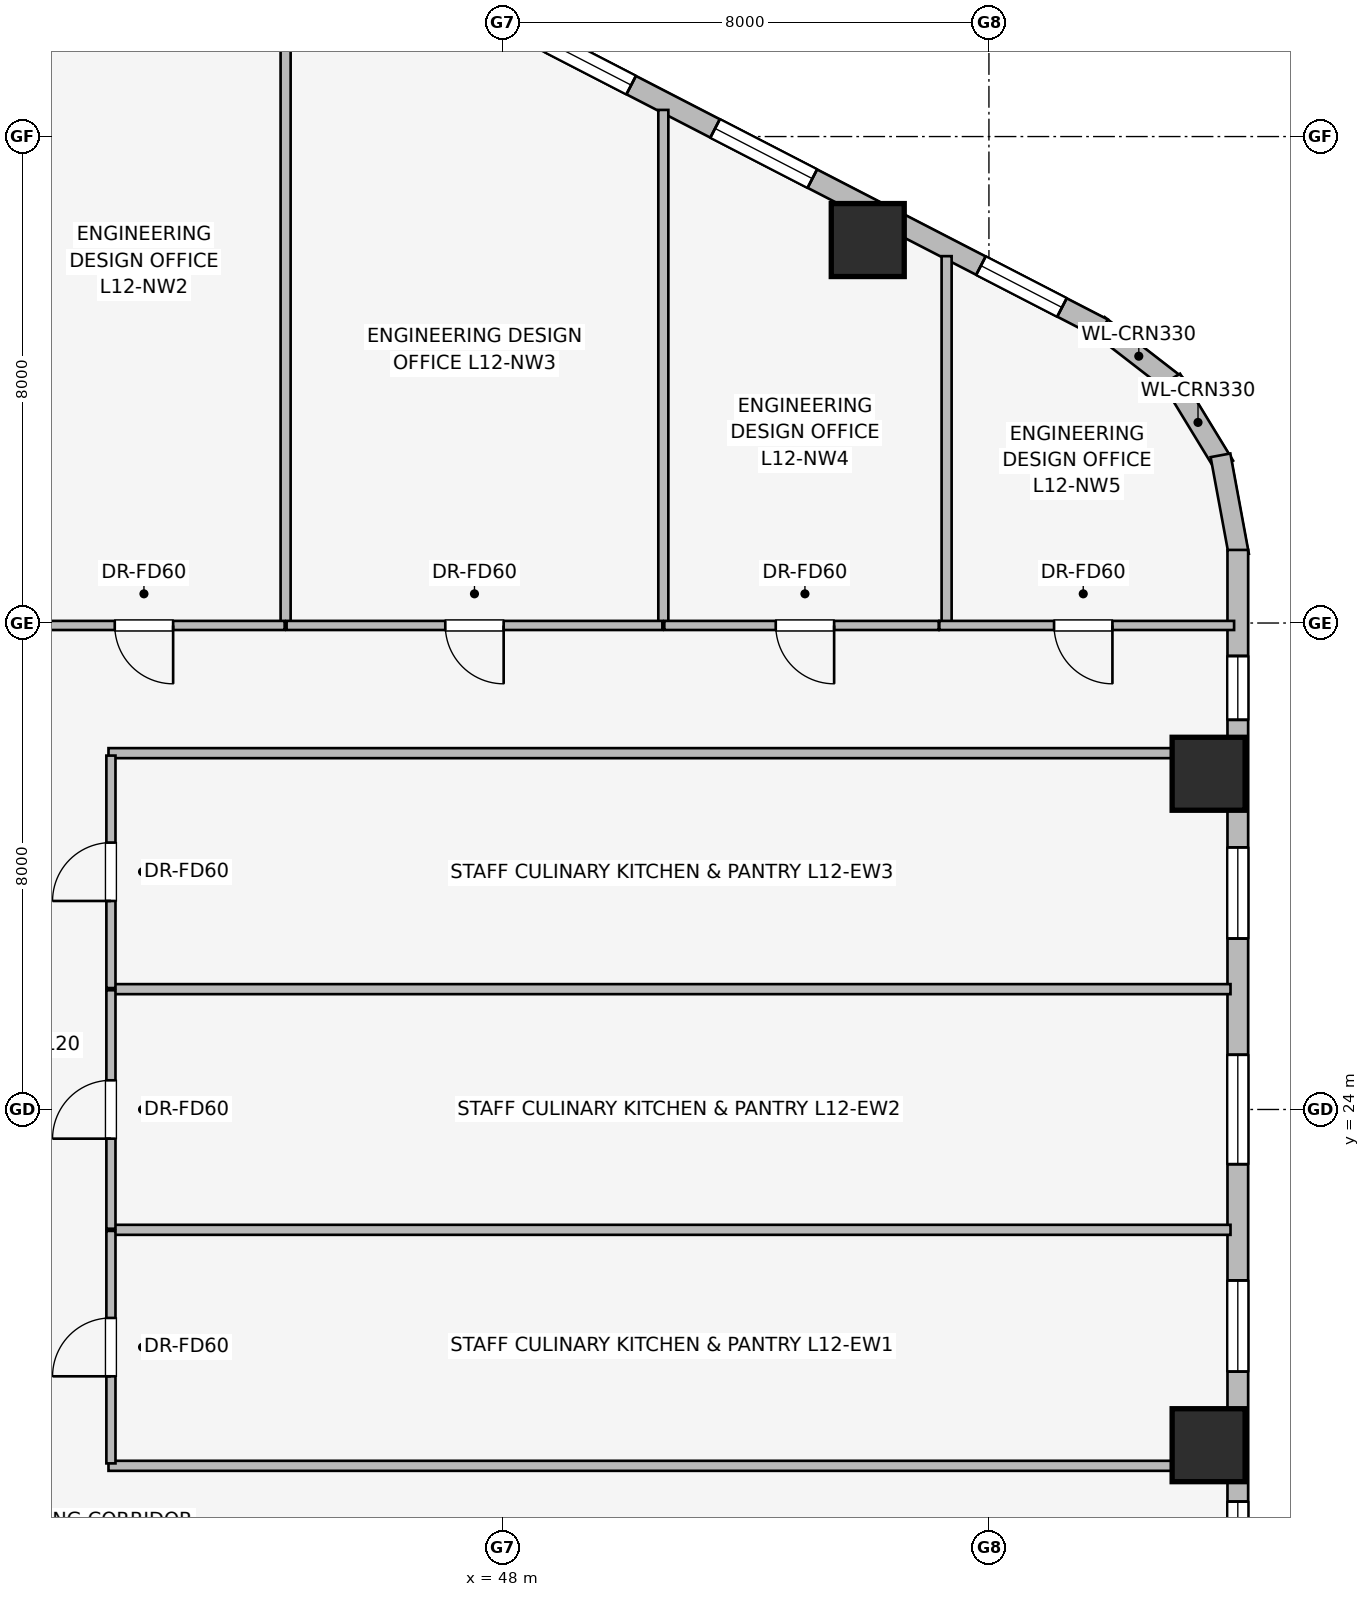
"""IFC4 building model, lengths in metres.
Left out: names, types, materials, properties, quantities, classifications, styles, units other than length and angle.
Written with IfcOpenShell. Run it as: python <this file> out.ifc"""

import sys

from ifc_helpers import new_model, si_unit, direction, frame, frame_2d, origin, origin_2d, place, context, subcontext, project, spatial, rectangle, extrude, element, fill, save


model = new_model("IFC4")
c1 = context("Model", 3, precision=1e-05, world=origin(), true_north=direction((0.0, 1.0)))
c2 = subcontext(c1, "Body", "Model", "MODEL_VIEW")
j1 = project(units=[si_unit("LENGTHUNIT", "METRE"), si_unit("PLANEANGLEUNIT", "RADIAN")], contexts=[c1])
p1 = place(None, origin())
s1 = spatial("IfcSite", under=j1, at=p1, CompositionType="ELEMENT")
p2 = place(p1, origin())
s2 = spatial("IfcBuilding", under=s1, at=p2, CompositionType="ELEMENT")
p3 = place(p2, frame((0.0, 0.0, 48.9)))
s3 = spatial("IfcBuildingStorey", under=s2, at=p3, CompositionType="ELEMENT", Elevation=48.9)
for number, where, z_axis, x_axis in (
    (1, (54.007, 38.298, 0.0), (0.0, 0.0, 1.0), (1.0, 0.0, 0.0)),
    (2, (59.613, 18.479, 0.0), (0.0, 0.0, 1.0), (1.0, 0.0, 0.0)),
    (3, (59.613, 29.521, 0.0), (0.0, 0.0, 1.0), (1.0, 0.0, 0.0)),
):
    element("IfcColumn", number, at=place(p3, frame(where, z_axis=z_axis, x_axis=x_axis)), inside=s3, PredefinedType="COLUMN", context=c2, shape_type="SweptSolid", body=[
        extrude(rectangle(XDim=1.2, YDim=1.2, at=origin_2d()), origin(), (0.0, 0.0, 1.0), 3.65),
    ])
p4 = place(p3, frame((57.802, 36.901, 0.0), z_axis=(0.0, 0.0, 1.0), x_axis=(0.790691856293, -0.61221433207, 0.0)))
e4 = element("IfcWall", 4, at=p4, inside=s3, PredefinedType="STANDARD", context=c2, shape_type="SweptSolid", body=[
    extrude(rectangle(XDim=1.676, YDim=0.33, at=frame_2d((0.838, 0.0))), origin(), (0.0, 0.0, 1.0), 3.36),
])
p5 = place(p3, frame((59.002, 36.015, 0.0), z_axis=(0.0, 0.0, 1.0), x_axis=(0.520584129191, -0.853810379671, 0.0)))
e5 = element("IfcWall", 5, at=p5, inside=s3, PredefinedType="STANDARD", context=c2, shape_type="SweptSolid", body=[
    extrude(rectangle(XDim=1.677, YDim=0.33, at=frame_2d((0.838, 0.0))), origin(), (0.0, 0.0, 1.0), 3.36),
])
p6 = place(p3, frame((59.808, 34.758, 0.0), z_axis=(0.0, 0.0, 1.0), x_axis=(0.181714143354, -0.983351397063, 0.0)))
e6 = element("IfcWall", 6, at=p6, inside=s3, PredefinedType="STANDARD", context=c2, shape_type="SweptSolid", body=[
    extrude(rectangle(XDim=1.678, YDim=0.33, at=frame_2d((0.839, 0.0))), origin(), (0.0, 0.0, 1.0), 3.36),
])
p7 = place(p3, frame((39.631, 46.257, 0.0), z_axis=(0.0, 0.0, 1.0), x_axis=(0.888634413993, -0.458616264721, 0.0)))
e7 = element("IfcWall", 7, at=p7, inside=s3, PredefinedType="STANDARD", context=c2, shape_type="SweptSolid", body=[
    extrude(rectangle(XDim=20.531, YDim=0.34, at=frame_2d((10.266, 0.0))), origin(), (0.0, 0.0, 1.0), 2.654),
])
p8 = place(p7, frame((1.076, 0.0, 0.75)))
e8 = element("IfcOpeningElement", 8, at=p8, cuts=e7, PredefinedType="OPENING", context=c2, shape_type="SweptSolid", body=[
    extrude(rectangle(XDim=1.8, YDim=1.5, at=frame_2d((0.9, 0.75))), frame((0.0, 0.18, 0.0), z_axis=(0.0, -1.0, 0.0), x_axis=(1.0, 0.0, 0.0)), (0.0, 0.0, 1.0), 0.36),
])
p9 = place(p7, frame((6.122, 0.0, 0.75)))
e9 = element("IfcOpeningElement", 9, at=p9, cuts=e7, PredefinedType="OPENING", context=c2, shape_type="SweptSolid", body=[
    extrude(rectangle(XDim=1.5, YDim=1.5, at=frame_2d((0.75, 0.75))), frame((0.0, 0.18, 0.0), z_axis=(0.0, -1.0, 0.0), x_axis=(1.0, 0.0, 0.0)), (0.0, 0.0, 1.0), 0.36),
])
p10 = place(p7, frame((8.211, 0.0, 0.75)))
e10 = element("IfcOpeningElement", 10, at=p10, cuts=e7, PredefinedType="OPENING", context=c2, shape_type="SweptSolid", body=[
    extrude(rectangle(XDim=1.5, YDim=1.5, at=frame_2d((0.75, 0.75))), frame((0.0, 0.18, 0.0), z_axis=(0.0, -1.0, 0.0), x_axis=(1.0, 0.0, 0.0)), (0.0, 0.0, 1.0), 0.36),
])
p11 = place(p7, frame((10.299, 0.0, 0.75)))
e11 = element("IfcOpeningElement", 11, at=p11, cuts=e7, PredefinedType="OPENING", context=c2, shape_type="SweptSolid", body=[
    extrude(rectangle(XDim=1.5, YDim=1.5, at=frame_2d((0.75, 0.75))), frame((0.0, 0.18, 0.0), z_axis=(0.0, -1.0, 0.0), x_axis=(1.0, 0.0, 0.0)), (0.0, 0.0, 1.0), 0.36),
])
p12 = place(p7, frame((13.352, 0.0, 0.75)))
e12 = element("IfcOpeningElement", 12, at=p12, cuts=e7, PredefinedType="OPENING", context=c2, shape_type="SweptSolid", body=[
    extrude(rectangle(XDim=1.8, YDim=1.5, at=frame_2d((0.9, 0.75))), frame((0.0, 0.18, 0.0), z_axis=(0.0, -1.0, 0.0), x_axis=(1.0, 0.0, 0.0)), (0.0, 0.0, 1.0), 0.36),
])
p13 = place(p7, frame((18.272, 0.0, 0.75)))
e13 = element("IfcOpeningElement", 13, at=p13, cuts=e7, PredefinedType="OPENING", context=c2, shape_type="SweptSolid", body=[
    extrude(rectangle(XDim=1.5, YDim=1.5, at=frame_2d((0.75, 0.75))), frame((0.0, 0.18, 0.0), z_axis=(0.0, -1.0, 0.0), x_axis=(1.0, 0.0, 0.0)), (0.0, 0.0, 1.0), 0.36),
])
p14 = place(p3, frame((60.093, 33.202, 0.0), z_axis=(0.0, 0.0, 1.0), x_axis=(0.0, -1.0, 0.0)))
e14 = element("IfcWall", 14, at=p14, inside=s3, PredefinedType="STANDARD", context=c2, shape_type="SweptSolid", body=[
    extrude(rectangle(XDim=18.404, YDim=0.34, at=frame_2d((9.202, 0.0))), origin(), (0.0, 0.0, 1.0), 2.654),
])
p15 = place(p14, frame((1.744, 0.0, 0.75)))
e15 = element("IfcOpeningElement", 15, at=p15, cuts=e14, PredefinedType="OPENING", context=c2, shape_type="SweptSolid", body=[
    extrude(rectangle(XDim=1.05, YDim=1.4, at=frame_2d((0.525, 0.7))), frame((0.0, 0.18, 0.0), z_axis=(0.0, -1.0, 0.0), x_axis=(1.0, 0.0, 0.0)), (0.0, 0.0, 1.0), 0.36),
])
p16 = place(p14, frame((4.891, 0.0, 0.75)))
e16 = element("IfcOpeningElement", 16, at=p16, cuts=e14, PredefinedType="OPENING", context=c2, shape_type="SweptSolid", body=[
    extrude(rectangle(XDim=1.5, YDim=1.5, at=frame_2d((0.75, 0.75))), frame((0.0, 0.18, 0.0), z_axis=(0.0, -1.0, 0.0), x_axis=(1.0, 0.0, 0.0)), (0.0, 0.0, 1.0), 0.36),
])
p17 = place(p14, frame((8.302, 0.0, 0.75)))
e17 = element("IfcOpeningElement", 17, at=p17, cuts=e14, PredefinedType="OPENING", context=c2, shape_type="SweptSolid", body=[
    extrude(rectangle(XDim=1.8, YDim=1.5, at=frame_2d((0.9, 0.75))), frame((0.0, 0.18, 0.0), z_axis=(0.0, -1.0, 0.0), x_axis=(1.0, 0.0, 0.0)), (0.0, 0.0, 1.0), 0.36),
])
p18 = place(p14, frame((12.013, 0.0, 0.75)))
e18 = element("IfcOpeningElement", 18, at=p18, cuts=e14, PredefinedType="OPENING", context=c2, shape_type="SweptSolid", body=[
    extrude(rectangle(XDim=1.5, YDim=1.5, at=frame_2d((0.75, 0.75))), frame((0.0, 0.18, 0.0), z_axis=(0.0, -1.0, 0.0), x_axis=(1.0, 0.0, 0.0)), (0.0, 0.0, 1.0), 0.36),
])
p19 = place(p14, frame((15.65, 0.0, 0.75)))
e19 = element("IfcOpeningElement", 19, at=p19, cuts=e14, PredefinedType="OPENING", context=c2, shape_type="SweptSolid", body=[
    extrude(rectangle(XDim=1.05, YDim=1.4, at=frame_2d((0.525, 0.7))), frame((0.0, 0.18, 0.0), z_axis=(0.0, -1.0, 0.0), x_axis=(1.0, 0.0, 0.0)), (0.0, 0.0, 1.0), 0.36),
])
p20 = place(p3, frame((44.433, 31.97, 0.0), z_axis=(0.0, 0.0, 1.0), x_axis=(0.0, 1.0, 0.0)))
e20 = element("IfcWall", 20, at=p20, inside=s3, PredefinedType="PARTITIONING", context=c2, shape_type="SweptSolid", body=[
    extrude(rectangle(XDim=11.674, YDim=0.165, at=frame_2d((5.837, 0.0))), origin(), (0.0, 0.0, 1.0), 3.36),
])
p21 = place(p3, frame((50.645, 31.97, 0.0), z_axis=(0.0, 0.0, 1.0), x_axis=(0.0, 1.0, 0.0)))
e21 = element("IfcWall", 21, at=p21, inside=s3, PredefinedType="PARTITIONING", context=c2, shape_type="SweptSolid", body=[
    extrude(rectangle(XDim=8.468, YDim=0.165, at=frame_2d((4.234, 0.0))), origin(), (0.0, 0.0, 1.0), 3.36),
])
p22 = place(p3, frame((55.304, 31.97, 0.0), z_axis=(0.0, 0.0, 1.0), x_axis=(0.0, 1.0, 0.0)))
e22 = element("IfcWall", 22, at=p22, inside=s3, PredefinedType="PARTITIONING", context=c2, shape_type="SweptSolid", body=[
    extrude(rectangle(XDim=6.063, YDim=0.165, at=frame_2d((3.031, 0.0))), origin(), (0.0, 0.0, 1.0), 3.36),
])
p23 = place(p3, frame((44.417, 31.96, 0.0), z_axis=(0.0, 0.0, 1.0), x_axis=(-1.0, 0.0, 0.0)))
e23 = element("IfcWall", 23, at=p23, inside=s3, PredefinedType="PARTITIONING", context=c2, shape_type="SweptSolid", body=[
    extrude(rectangle(XDim=4.513, YDim=0.15, at=frame_2d((2.256, 0.0))), origin(), (0.0, 0.0, 1.0), 3.36),
])
p24 = place(p23, frame((1.834, 0.0, 0.0)))
e24 = element("IfcOpeningElement", 24, at=p24, cuts=e23, PredefinedType="OPENING", context=c2, shape_type="SweptSolid", body=[
    extrude(rectangle(XDim=0.96, YDim=2.0, at=frame_2d((0.48, 1.0))), frame((0.0, 0.085, 0.0), z_axis=(0.0, -1.0, 0.0), x_axis=(1.0, 0.0, 0.0)), (0.0, 0.0, 1.0), 0.17),
])
p25 = place(p3, frame((50.629, 31.96, 0.0), z_axis=(0.0, 0.0, 1.0), x_axis=(-1.0, 0.0, 0.0)))
e25 = element("IfcWall", 25, at=p25, inside=s3, PredefinedType="PARTITIONING", context=c2, shape_type="SweptSolid", body=[
    extrude(rectangle(XDim=6.18, YDim=0.15, at=frame_2d((3.09, 0.0))), origin(), (0.0, 0.0, 1.0), 3.36),
])
p26 = place(p25, frame((2.61, 0.0, 0.0)))
e26 = element("IfcOpeningElement", 26, at=p26, cuts=e25, PredefinedType="OPENING", context=c2, shape_type="SweptSolid", body=[
    extrude(rectangle(XDim=0.96, YDim=2.0, at=frame_2d((0.48, 1.0))), frame((0.0, 0.085, 0.0), z_axis=(0.0, -1.0, 0.0), x_axis=(1.0, 0.0, 0.0)), (0.0, 0.0, 1.0), 0.17),
])
p27 = place(p3, frame((55.174, 31.96, 0.0), z_axis=(0.0, 0.0, 1.0), x_axis=(-1.0, 0.0, 0.0)))
e27 = element("IfcWall", 27, at=p27, inside=s3, PredefinedType="PARTITIONING", context=c2, shape_type="SweptSolid", body=[
    extrude(rectangle(XDim=4.513, YDim=0.15, at=frame_2d((2.257, 0.0))), origin(), (0.0, 0.0, 1.0), 3.36),
])
p28 = place(p27, frame((1.72, 0.0, 0.0)))
e28 = element("IfcOpeningElement", 28, at=p28, cuts=e27, PredefinedType="OPENING", context=c2, shape_type="SweptSolid", body=[
    extrude(rectangle(XDim=0.96, YDim=2.0, at=frame_2d((0.48, 1.0))), frame((0.0, 0.085, 0.0), z_axis=(0.0, -1.0, 0.0), x_axis=(1.0, 0.0, 0.0)), (0.0, 0.0, 1.0), 0.17),
])
p29 = place(p3, frame((60.032, 31.96, 0.0), z_axis=(0.0, 0.0, 1.0), x_axis=(-1.0, 0.0, 0.0)))
e29 = element("IfcWall", 29, at=p29, inside=s3, PredefinedType="PARTITIONING", context=c2, shape_type="SweptSolid", body=[
    extrude(rectangle(XDim=4.848, YDim=0.15, at=frame_2d((2.424, 0.0))), origin(), (0.0, 0.0, 1.0), 3.36),
])
p30 = place(p29, frame((2.001, 0.0, 0.0)))
e30 = element("IfcOpeningElement", 30, at=p30, cuts=e29, PredefinedType="OPENING", context=c2, shape_type="SweptSolid", body=[
    extrude(rectangle(XDim=0.96, YDim=2.0, at=frame_2d((0.48, 1.0))), frame((0.0, 0.085, 0.0), z_axis=(0.0, -1.0, 0.0), x_axis=(1.0, 0.0, 0.0)), (0.0, 0.0, 1.0), 0.17),
])
for number, where, z_axis, x_axis in (
    (31, (41.52, 18.14, 0.0), (0.0, 0.0, 1.0), (1.0, 0.0, 0.0)),
    (32, (41.52, 29.86, 0.0), (0.0, 0.0, 1.0), (1.0, 0.0, 0.0)),
):
    element("IfcWall", number, at=place(p3, frame(where, z_axis=z_axis, x_axis=x_axis)), inside=s3, PredefinedType="PARTITIONING", context=c2, shape_type="SweptSolid", body=[
        extrude(rectangle(XDim=18.453, YDim=0.165, at=frame_2d((9.227, 0.0))), origin(), (0.0, 0.0, 1.0), 2.268),
    ])
for number, where, z_axis, x_axis in (
    (33, (41.59, 22.021, 0.0), (0.0, 0.0, 1.0), (1.0, 0.0, 0.0)),
    (34, (41.59, 25.979, 0.0), (0.0, 0.0, 1.0), (1.0, 0.0, 0.0)),
):
    element("IfcWall", number, at=place(p3, frame(where, z_axis=z_axis, x_axis=x_axis)), inside=s3, PredefinedType="PARTITIONING", context=c2, shape_type="SweptSolid", body=[
        extrude(rectangle(XDim=18.383, YDim=0.165, at=frame_2d((9.191, 0.0))), origin(), (0.0, 0.0, 1.0), 3.36),
    ])
p31 = place(p3, frame((41.56, 18.18, 0.0), z_axis=(0.0, 0.0, 1.0), x_axis=(0.0, 1.0, 0.0)))
e35 = element("IfcWall", 35, at=p31, inside=s3, PredefinedType="PARTITIONING", context=c2, shape_type="SweptSolid", body=[
    extrude(rectangle(XDim=3.823, YDim=0.15, at=frame_2d((1.912, 0.0))), origin(), (0.0, 0.0, 1.0), 3.36),
])
p32 = place(p31, frame((1.432, 0.0, 0.0)))
e36 = element("IfcOpeningElement", 36, at=p32, cuts=e35, PredefinedType="OPENING", context=c2, shape_type="SweptSolid", body=[
    extrude(rectangle(XDim=0.96, YDim=2.0, at=frame_2d((0.48, 1.0))), frame((0.0, 0.085, 0.0), z_axis=(0.0, -1.0, 0.0), x_axis=(1.0, 0.0, 0.0)), (0.0, 0.0, 1.0), 0.17),
])
p33 = place(p3, frame((41.56, 22.039, 0.0), z_axis=(0.0, 0.0, 1.0), x_axis=(0.0, 1.0, 0.0)))
e37 = element("IfcWall", 37, at=p33, inside=s3, PredefinedType="PARTITIONING", context=c2, shape_type="SweptSolid", body=[
    extrude(rectangle(XDim=3.922, YDim=0.15, at=frame_2d((1.961, 0.0))), origin(), (0.0, 0.0, 1.0), 3.36),
])
p34 = place(p33, frame((1.481, 0.0, 0.0)))
e38 = element("IfcOpeningElement", 38, at=p34, cuts=e37, PredefinedType="OPENING", context=c2, shape_type="SweptSolid", body=[
    extrude(rectangle(XDim=0.96, YDim=2.0, at=frame_2d((0.48, 1.0))), frame((0.0, 0.085, 0.0), z_axis=(0.0, -1.0, 0.0), x_axis=(1.0, 0.0, 0.0)), (0.0, 0.0, 1.0), 0.17),
])
p35 = place(p3, frame((41.56, 25.997, 0.0), z_axis=(0.0, 0.0, 1.0), x_axis=(0.0, 1.0, 0.0)))
e39 = element("IfcWall", 39, at=p35, inside=s3, PredefinedType="PARTITIONING", context=c2, shape_type="SweptSolid", body=[
    extrude(rectangle(XDim=3.823, YDim=0.15, at=frame_2d((1.912, 0.0))), origin(), (0.0, 0.0, 1.0), 3.36),
])
p36 = place(p35, frame((1.432, 0.0, 0.0)))
e40 = element("IfcOpeningElement", 40, at=p36, cuts=e39, PredefinedType="OPENING", context=c2, shape_type="SweptSolid", body=[
    extrude(rectangle(XDim=0.96, YDim=2.0, at=frame_2d((0.48, 1.0))), frame((0.0, 0.085, 0.0), z_axis=(0.0, -1.0, 0.0), x_axis=(1.0, 0.0, 0.0)), (0.0, 0.0, 1.0), 0.17),
])
p37 = place(p11, origin())
e41 = element("IfcWindow", 41, at=p37, inside=s3, PartitioningType="SINGLE_PANEL", PredefinedType="WINDOW", context=c2, shape_type="SweptSolid", body=[
    extrude(rectangle(XDim=1.5, YDim=1.5, at=frame_2d((0.75, 0.75))), frame((0.0, 0.03, 0.0), z_axis=(0.0, -1.0, 0.0), x_axis=(1.0, 0.0, 0.0)), (0.0, 0.0, 1.0), 0.06),
])
fill(e11, e41)
p38 = place(p12, origin())
e42 = element("IfcWindow", 42, at=p38, inside=s3, PartitioningType="SINGLE_PANEL", PredefinedType="WINDOW", context=c2, shape_type="SweptSolid", body=[
    extrude(rectangle(XDim=1.8, YDim=1.5, at=frame_2d((0.9, 0.75))), frame((0.0, 0.03, 0.0), z_axis=(0.0, -1.0, 0.0), x_axis=(1.0, 0.0, 0.0)), (0.0, 0.0, 1.0), 0.06),
])
fill(e12, e42)
p39 = place(p13, origin())
e43 = element("IfcWindow", 43, at=p39, inside=s3, PartitioningType="SINGLE_PANEL", PredefinedType="WINDOW", context=c2, shape_type="SweptSolid", body=[
    extrude(rectangle(XDim=1.5, YDim=1.5, at=frame_2d((0.75, 0.75))), frame((0.0, 0.03, 0.0), z_axis=(0.0, -1.0, 0.0), x_axis=(1.0, 0.0, 0.0)), (0.0, 0.0, 1.0), 0.06),
])
fill(e13, e43)
p40 = place(p15, origin())
e44 = element("IfcWindow", 44, at=p40, inside=s3, PartitioningType="SINGLE_PANEL", PredefinedType="WINDOW", context=c2, shape_type="SweptSolid", body=[
    extrude(rectangle(XDim=1.05, YDim=1.4, at=frame_2d((0.525, 0.7))), frame((0.0, 0.03, 0.0), z_axis=(0.0, -1.0, 0.0), x_axis=(1.0, 0.0, 0.0)), (0.0, 0.0, 1.0), 0.06),
])
fill(e15, e44)
p41 = place(p16, origin())
e45 = element("IfcWindow", 45, at=p41, inside=s3, PartitioningType="SINGLE_PANEL", PredefinedType="WINDOW", context=c2, shape_type="SweptSolid", body=[
    extrude(rectangle(XDim=1.5, YDim=1.5, at=frame_2d((0.75, 0.75))), frame((0.0, 0.03, 0.0), z_axis=(0.0, -1.0, 0.0), x_axis=(1.0, 0.0, 0.0)), (0.0, 0.0, 1.0), 0.06),
])
fill(e16, e45)
p42 = place(p17, origin())
e46 = element("IfcWindow", 46, at=p42, inside=s3, PartitioningType="SINGLE_PANEL", PredefinedType="WINDOW", context=c2, shape_type="SweptSolid", body=[
    extrude(rectangle(XDim=1.8, YDim=1.5, at=frame_2d((0.9, 0.75))), frame((0.0, 0.03, 0.0), z_axis=(0.0, -1.0, 0.0), x_axis=(1.0, 0.0, 0.0)), (0.0, 0.0, 1.0), 0.06),
])
fill(e17, e46)
p43 = place(p18, origin())
e47 = element("IfcWindow", 47, at=p43, inside=s3, PartitioningType="SINGLE_PANEL", PredefinedType="WINDOW", context=c2, shape_type="SweptSolid", body=[
    extrude(rectangle(XDim=1.5, YDim=1.5, at=frame_2d((0.75, 0.75))), frame((0.0, 0.03, 0.0), z_axis=(0.0, -1.0, 0.0), x_axis=(1.0, 0.0, 0.0)), (0.0, 0.0, 1.0), 0.06),
])
fill(e18, e47)
p44 = place(p19, origin())
e48 = element("IfcWindow", 48, at=p44, inside=s3, PartitioningType="SINGLE_PANEL", PredefinedType="WINDOW", context=c2, shape_type="SweptSolid", body=[
    extrude(rectangle(XDim=1.05, YDim=1.4, at=frame_2d((0.525, 0.7))), frame((0.0, 0.03, 0.0), z_axis=(0.0, -1.0, 0.0), x_axis=(1.0, 0.0, 0.0)), (0.0, 0.0, 1.0), 0.06),
])
fill(e19, e48)
p45 = place(p24, origin())
e49 = element("IfcDoor", 49, at=p45, inside=s3, OperationType="SINGLE_SWING_LEFT", PredefinedType="DOOR", context=c2, shape_type="SweptSolid", body=[
    extrude(rectangle(XDim=0.96, YDim=2.0, at=frame_2d((0.48, 1.0))), frame((0.0, 0.025, 0.0), z_axis=(0.0, -1.0, 0.0), x_axis=(1.0, 0.0, 0.0)), (0.0, 0.0, 1.0), 0.05),
])
fill(e24, e49)
p46 = place(p26, origin())
e50 = element("IfcDoor", 50, at=p46, inside=s3, OperationType="SINGLE_SWING_LEFT", PredefinedType="DOOR", context=c2, shape_type="SweptSolid", body=[
    extrude(rectangle(XDim=0.96, YDim=2.0, at=frame_2d((0.48, 1.0))), frame((0.0, 0.025, 0.0), z_axis=(0.0, -1.0, 0.0), x_axis=(1.0, 0.0, 0.0)), (0.0, 0.0, 1.0), 0.05),
])
fill(e26, e50)
p47 = place(p28, origin())
e51 = element("IfcDoor", 51, at=p47, inside=s3, OperationType="SINGLE_SWING_LEFT", PredefinedType="DOOR", context=c2, shape_type="SweptSolid", body=[
    extrude(rectangle(XDim=0.96, YDim=2.0, at=frame_2d((0.48, 1.0))), frame((0.0, 0.025, 0.0), z_axis=(0.0, -1.0, 0.0), x_axis=(1.0, 0.0, 0.0)), (0.0, 0.0, 1.0), 0.05),
])
fill(e28, e51)
p48 = place(p30, origin())
e52 = element("IfcDoor", 52, at=p48, inside=s3, OperationType="SINGLE_SWING_LEFT", PredefinedType="DOOR", context=c2, shape_type="SweptSolid", body=[
    extrude(rectangle(XDim=0.96, YDim=2.0, at=frame_2d((0.48, 1.0))), frame((0.0, 0.025, 0.0), z_axis=(0.0, -1.0, 0.0), x_axis=(1.0, 0.0, 0.0)), (0.0, 0.0, 1.0), 0.05),
])
fill(e30, e52)
p49 = place(p32, origin())
e53 = element("IfcDoor", 53, at=p49, inside=s3, OperationType="SINGLE_SWING_LEFT", PredefinedType="DOOR", context=c2, shape_type="SweptSolid", body=[
    extrude(rectangle(XDim=0.96, YDim=2.0, at=frame_2d((0.48, 1.0))), frame((0.0, 0.025, 0.0), z_axis=(0.0, -1.0, 0.0), x_axis=(1.0, 0.0, 0.0)), (0.0, 0.0, 1.0), 0.05),
])
fill(e36, e53)
p50 = place(p34, origin())
e54 = element("IfcDoor", 54, at=p50, inside=s3, OperationType="SINGLE_SWING_LEFT", PredefinedType="DOOR", context=c2, shape_type="SweptSolid", body=[
    extrude(rectangle(XDim=0.96, YDim=2.0, at=frame_2d((0.48, 1.0))), frame((0.0, 0.025, 0.0), z_axis=(0.0, -1.0, 0.0), x_axis=(1.0, 0.0, 0.0)), (0.0, 0.0, 1.0), 0.05),
])
fill(e38, e54)
p51 = place(p36, origin())
e55 = element("IfcDoor", 55, at=p51, inside=s3, OperationType="SINGLE_SWING_LEFT", PredefinedType="DOOR", context=c2, shape_type="SweptSolid", body=[
    extrude(rectangle(XDim=0.96, YDim=2.0, at=frame_2d((0.48, 1.0))), frame((0.0, 0.025, 0.0), z_axis=(0.0, -1.0, 0.0), x_axis=(1.0, 0.0, 0.0)), (0.0, 0.0, 1.0), 0.05),
])
fill(e40, e55)
save(model, sys.argv[1])
